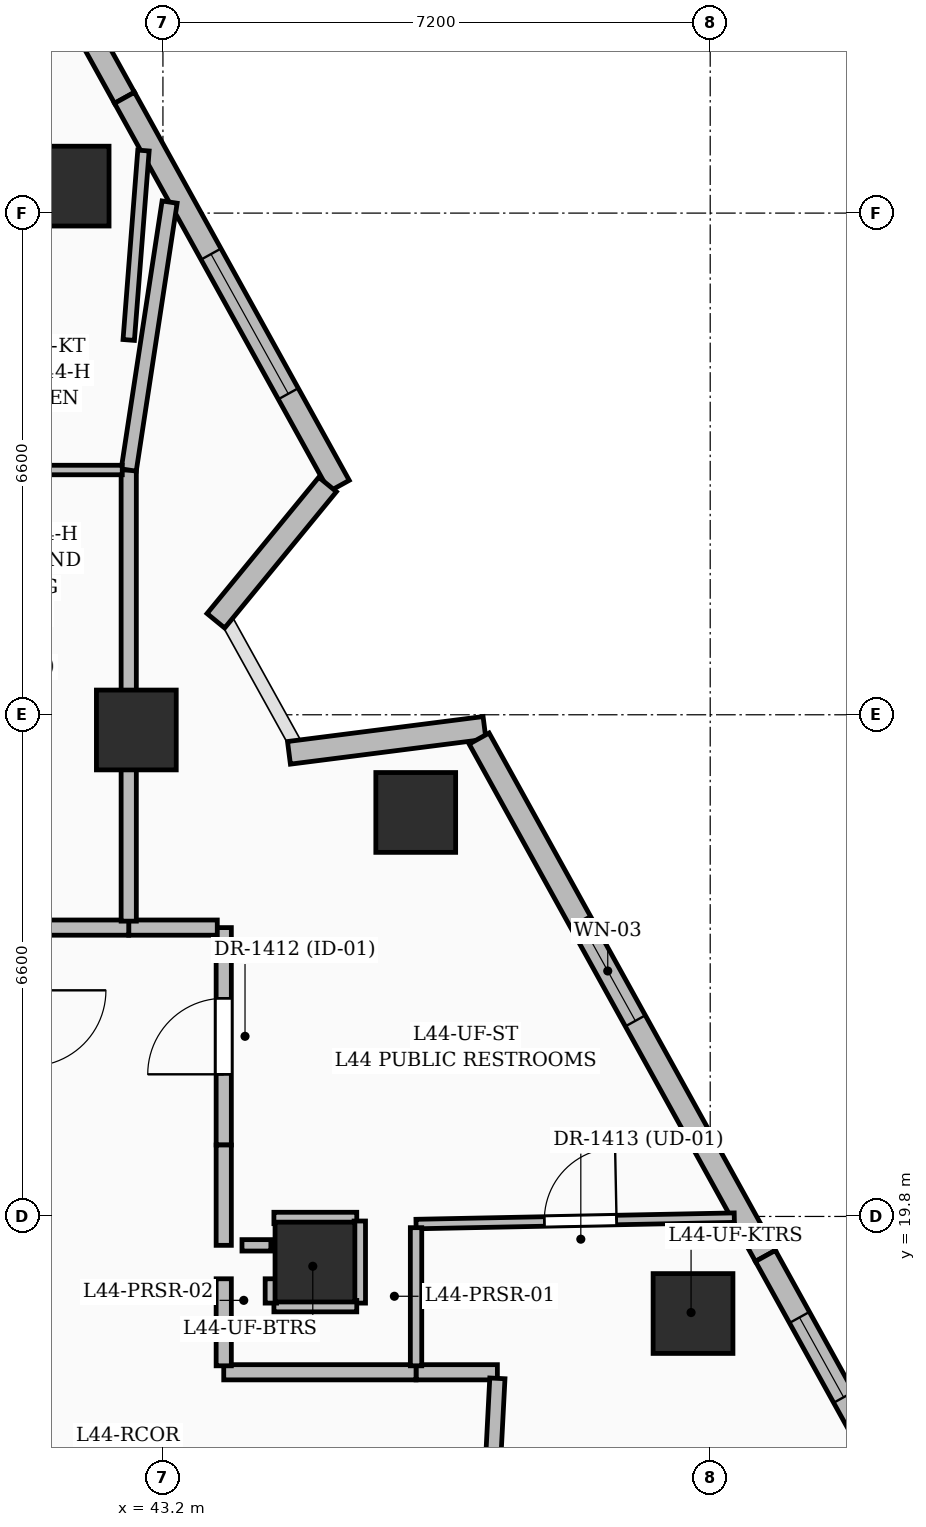
"""IFC4 building model, lengths in metres.
Left out: names, types, materials, properties, quantities, classifications, styles, units other than length and angle.
Written with IfcOpenShell. Run it as: python <this file> out.ifc"""

import sys

from ifc_helpers import new_model, si_unit, direction, frame, frame_2d, origin, origin_2d, place, context, subcontext, project, spatial, rectangle, extrude, element, fill, save


model = new_model("IFC4")
c1 = context("Model", 3, precision=1e-05, world=origin(), true_north=direction((0.0, 1.0)))
c2 = subcontext(c1, "Body", "Model", "MODEL_VIEW")
j1 = project(units=[si_unit("LENGTHUNIT", "METRE"), si_unit("PLANEANGLEUNIT", "RADIAN")], contexts=[c1])
p1 = place(None, origin())
s1 = spatial("IfcSite", under=j1, at=p1, CompositionType="ELEMENT")
p2 = place(p1, origin())
s2 = spatial("IfcBuilding", under=s1, at=p2, CompositionType="ELEMENT")
p3 = place(p2, frame((0.0, 0.0, 171.6)))
s3 = spatial("IfcBuildingStorey", under=s2, at=p3, CompositionType="ELEMENT", Elevation=171.6)
for number, where, z_axis, x_axis in (
    (1, (45.2, 19.2, 0.0), (0.0, 0.0, 1.0), (1.0, 0.0, 0.0)),
    (2, (42.85, 26.2, 0.0), (0.0, 0.0, 1.0), (1.0, 0.0, 0.0)),
    (3, (50.174, 18.523, 0.0), (0.0, 0.0, 1.0), (1.0, 0.0, 0.0)),
    (4, (46.526, 25.115, 0.0), (0.0, 0.0, 1.0), (1.0, 0.0, 0.0)),
    (5, (41.966, 33.355, 0.0), (0.0, 0.0, 1.0), (1.0, 0.0, 0.0)),
):
    element("IfcColumn", number, at=place(p3, frame(where, z_axis=z_axis, x_axis=x_axis)), inside=s3, PredefinedType="COLUMN", context=c2, shape_type="SweptSolid", body=[
        extrude(rectangle(XDim=1.05, YDim=1.05, at=origin_2d()), origin(), (0.0, 0.0, 1.0), 3.6),
    ])
p4 = place(p3, frame((40.148, 39.119, 0.0), z_axis=(0.0, 0.0, 1.0), x_axis=(0.484195973422, -0.874959575822, 0.0)))
e6 = element("IfcWall", 6, at=p4, inside=s3, PredefinedType="SOLIDWALL", context=c2, shape_type="SweptSolid", body=[
    extrude(rectangle(XDim=5.26, YDim=0.3, at=frame_2d((2.63, 0.0))), origin(), (0.0, 0.0, 1.0), 3.35),
])
p5 = place(p4, frame((1.625, 0.0, 0.6)))
e7 = element("IfcOpeningElement", 7, at=p5, cuts=e6, PredefinedType="OPENING", context=c2, shape_type="SweptSolid", body=[
    extrude(rectangle(XDim=2.4, YDim=2.1, at=frame_2d((1.2, 1.05))), frame((0.0, 0.16, 0.0), z_axis=(0.0, -1.0, 0.0), x_axis=(1.0, 0.0, 0.0)), (0.0, 0.0, 1.0), 0.32),
])
p6 = place(p3, frame((42.695, 34.517, 0.0), z_axis=(0.0, 0.0, 1.0), x_axis=(0.484178621325, -0.874969178115, 0.0)))
e8 = element("IfcWall", 8, at=p6, inside=s3, PredefinedType="SOLIDWALL", context=c2, shape_type="SweptSolid", body=[
    extrude(rectangle(XDim=5.835, YDim=0.3, at=frame_2d((2.917, 0.0))), origin(), (0.0, 0.0, 1.0), 3.35),
])
p7 = place(p6, frame((2.35, 0.0, 0.55)))
e9 = element("IfcOpeningElement", 9, at=p7, cuts=e8, PredefinedType="OPENING", context=c2, shape_type="SweptSolid", body=[
    extrude(rectangle(XDim=2.1, YDim=2.4, at=frame_2d((1.05, 1.2))), frame((0.0, 0.16, 0.0), z_axis=(0.0, -1.0, 0.0), x_axis=(1.0, 0.0, 0.0)), (0.0, 0.0, 1.0), 0.32),
])
p8 = place(p3, frame((45.366, 29.43, 0.0), z_axis=(0.0, 0.0, 1.0), x_axis=(-0.634074551455, -0.773271920606, 0.0)))
e10 = element("IfcWall", 10, at=p8, inside=s3, PredefinedType="SOLIDWALL", context=c2, shape_type="SweptSolid", body=[
    extrude(rectangle(XDim=2.319, YDim=0.3, at=frame_2d((1.159, 0.0))), origin(), (0.0, 0.0, 1.0), 2.575),
])
p9 = place(p3, frame((44.858, 25.899, 0.0), z_axis=(0.0, 0.0, 1.0), x_axis=(0.991953049751, 0.126606267974, 0.0)))
e11 = element("IfcWall", 11, at=p9, inside=s3, PredefinedType="SOLIDWALL", context=c2, shape_type="SweptSolid", body=[
    extrude(rectangle(XDim=2.594, YDim=0.3, at=frame_2d((1.297, 0.0))), origin(), (0.0, 0.0, 1.0), 2.575),
])
p10 = place(p3, frame((47.36, 26.087, 0.0), z_axis=(0.0, 0.0, 1.0), x_axis=(0.484182040501, -0.874967286049, 0.0)))
e12 = element("IfcWall", 12, at=p10, inside=s3, PredefinedType="SOLIDWALL", context=c2, shape_type="SweptSolid", body=[
    extrude(rectangle(XDim=7.779, YDim=0.3, at=frame_2d((3.89, 0.0))), origin(), (0.0, 0.0, 1.0), 3.35),
])
p11 = place(p10, frame((2.745, 0.0, 0.6)))
e13 = element("IfcOpeningElement", 13, at=p11, cuts=e12, PredefinedType="OPENING", context=c2, shape_type="SweptSolid", body=[
    extrude(rectangle(XDim=1.5, YDim=2.1, at=frame_2d((0.75, 1.05))), frame((0.0, 0.16, 0.0), z_axis=(0.0, -1.0, 0.0), x_axis=(1.0, 0.0, 0.0)), (0.0, 0.0, 1.0), 0.32),
])
p12 = place(p3, frame((51.126, 19.281, 0.0), z_axis=(0.0, 0.0, 1.0), x_axis=(0.484181305153, -0.87496769297, 0.0)))
e14 = element("IfcWall", 14, at=p12, inside=s3, PredefinedType="SOLIDWALL", context=c2, shape_type="SweptSolid", body=[
    extrude(rectangle(XDim=8.059, YDim=0.3, at=frame_2d((4.03, 0.0))), origin(), (0.0, 0.0, 1.0), 3.35),
])
p13 = place(p12, frame((6.175, 0.0, 0.8)))
e15 = element("IfcOpeningElement", 15, at=p13, cuts=e14, PredefinedType="OPENING", context=c2, shape_type="SweptSolid", body=[
    extrude(rectangle(XDim=1.2, YDim=1.8, at=frame_2d((0.6, 0.9))), frame((0.0, 0.16, 0.0), z_axis=(0.0, -1.0, 0.0), x_axis=(1.0, 0.0, 0.0)), (0.0, 0.0, 1.0), 0.32),
])
p14 = place(p12, frame((3.55, 0.0, 0.8)))
e16 = element("IfcOpeningElement", 16, at=p14, cuts=e14, PredefinedType="OPENING", context=c2, shape_type="SweptSolid", body=[
    extrude(rectangle(XDim=1.2, YDim=1.8, at=frame_2d((0.6, 0.9))), frame((0.0, 0.16, 0.0), z_axis=(0.0, -1.0, 0.0), x_axis=(1.0, 0.0, 0.0)), (0.0, 0.0, 1.0), 0.32),
])
p15 = place(p12, frame((0.925, 0.0, 0.8)))
e17 = element("IfcOpeningElement", 17, at=p15, cuts=e14, PredefinedType="OPENING", context=c2, shape_type="SweptSolid", body=[
    extrude(rectangle(XDim=1.2, YDim=1.8, at=frame_2d((0.6, 0.9))), frame((0.0, 0.16, 0.0), z_axis=(0.0, -1.0, 0.0), x_axis=(1.0, 0.0, 0.0)), (0.0, 0.0, 1.0), 0.32),
])
p16 = place(p3, frame((44.0, 20.74, 0.0), z_axis=(0.0, 0.0, 1.0), x_axis=(0.0, 1.0, 0.0)))
e18 = element("IfcWall", 18, at=p16, inside=s3, PredefinedType="PARTITIONING", context=c2, shape_type="SweptSolid", body=[
    extrude(rectangle(XDim=2.86, YDim=0.2, at=frame_2d((1.43, 0.0))), origin(), (0.0, 0.0, 1.0), 2.436),
])
p17 = place(p16, frame((0.93, 0.0, 0.0)))
e19 = element("IfcOpeningElement", 19, at=p17, cuts=e18, PredefinedType="OPENING", context=c2, shape_type="SweptSolid", body=[
    extrude(rectangle(XDim=1.0, YDim=2.2, at=frame_2d((0.5, 1.1))), frame((0.0, 0.11, 0.0), z_axis=(0.0, -1.0, 0.0), x_axis=(1.0, 0.0, 0.0)), (0.0, 0.0, 1.0), 0.22),
])
p18 = place(p3, frame((43.915, 23.6, 0.0), z_axis=(0.0, 0.0, 1.0), x_axis=(-1.0, 0.0, 0.0)))
e20 = element("IfcWall", 20, at=p18, inside=s3, PredefinedType="PARTITIONING", context=c2, shape_type="SweptSolid", body=[
    extrude(rectangle(XDim=1.165, YDim=0.2, at=frame_2d((0.583, 0.0))), origin(), (0.0, 0.0, 1.0), 2.436),
])
p19 = place(p3, frame((47.6, 17.75, 0.0), z_axis=(0.0, 0.0, 1.0), x_axis=(-1.0, 0.0, 0.0)))
e21 = element("IfcWall", 21, at=p19, inside=s3, PredefinedType="PARTITIONING", context=c2, shape_type="SweptSolid", body=[
    extrude(rectangle(XDim=1.07, YDim=0.2, at=frame_2d((0.535, 0.0))), origin(), (0.0, 0.0, 1.0), 2.787),
])
p20 = place(p3, frame((46.53, 17.75, 0.0), z_axis=(0.0, 0.0, 1.0), x_axis=(-1.0, 0.0, 0.0)))
e22 = element("IfcWall", 22, at=p20, inside=s3, PredefinedType="PARTITIONING", context=c2, shape_type="SweptSolid", body=[
    extrude(rectangle(XDim=2.53, YDim=0.2, at=frame_2d((1.265, 0.0))), origin(), (0.0, 0.0, 1.0), 2.436),
])
p21 = place(p3, frame((44.0, 17.835, 0.0), z_axis=(0.0, 0.0, 1.0), x_axis=(0.0, 1.0, 0.0)))
e23 = element("IfcWall", 23, at=p21, inside=s3, PredefinedType="PARTITIONING", context=c2, shape_type="SweptSolid", body=[
    extrude(rectangle(XDim=1.145, YDim=0.2, at=frame_2d((0.573, 0.0))), origin(), (0.0, 0.0, 1.0), 3.35),
])
p22 = place(p3, frame((42.75, 23.6, 0.0), z_axis=(0.0, 0.0, 1.0), x_axis=(-1.0, 0.0, 0.0)))
e24 = element("IfcWall", 24, at=p22, inside=s3, PredefinedType="PARTITIONING", context=c2, shape_type="SweptSolid", body=[
    extrude(rectangle(XDim=1.3, YDim=0.2, at=frame_2d((0.65, 0.0))), origin(), (0.0, 0.0, 1.0), 3.35),
])
p23 = place(p3, frame((46.53, 19.7, 0.0), z_axis=(0.0, 0.0, 1.0), x_axis=(0.999798892802, 0.020054275168, 0.0)))
e25 = element("IfcWall", 25, at=p23, inside=s3, PredefinedType="PARTITIONING", context=c2, shape_type="SweptSolid", body=[
    extrude(rectangle(XDim=4.188, YDim=0.125, at=frame_2d((2.094, 0.0))), origin(), (0.0, 0.0, 1.0), 2.57),
])
p24 = place(p23, frame((1.688, 0.0, 0.0)))
e26 = element("IfcOpeningElement", 26, at=p24, cuts=e25, PredefinedType="OPENING", context=c2, shape_type="SweptSolid", body=[
    extrude(rectangle(XDim=0.95, YDim=2.2, at=frame_2d((0.475, 1.1))), frame((0.0, 0.072, 0.0), z_axis=(0.0, -1.0, 0.0), x_axis=(1.0, 0.0, 0.0)), (0.0, 0.0, 1.0), 0.145),
])
p25 = place(p3, frame((42.75, 29.62, 0.0), z_axis=(0.0, 0.0, 1.0), x_axis=(0.0, -1.0, 0.0)))
e27 = element("IfcWall", 27, at=p25, inside=s3, PredefinedType="PARTITIONING", context=c2, shape_type="SweptSolid", body=[
    extrude(rectangle(XDim=5.935, YDim=0.2, at=frame_2d((2.968, 0.0))), origin(), (0.0, 0.0, 1.0), 1.12),
])
p26 = place(p3, frame((43.288, 33.145, 0.0), z_axis=(0.0, 0.0, 1.0), x_axis=(-0.150904593609, -0.988548331458, 0.0)))
e28 = element("IfcWall", 28, at=p26, inside=s3, PredefinedType="PARTITIONING", context=c2, shape_type="SweptSolid", body=[
    extrude(rectangle(XDim=3.566, YDim=0.2, at=frame_2d((1.783, 0.0))), origin(), (0.0, 0.0, 1.0), 1.12),
])
p27 = place(p3, frame((46.53, 19.653, 0.0), z_axis=(0.0, 0.0, 1.0), x_axis=(0.0, -1.0, 0.0)))
e29 = element("IfcWall", 29, at=p27, inside=s3, PredefinedType="PARTITIONING", context=c2, shape_type="SweptSolid", body=[
    extrude(rectangle(XDim=1.818, YDim=0.15, at=frame_2d((0.909, 0.0))), origin(), (0.0, 0.0, 1.0), 2.787),
])
p28 = place(p3, frame((42.665, 29.62, 0.0), z_axis=(0.0, 0.0, 1.0), x_axis=(-1.0, 0.0, 0.0)))
e30 = element("IfcWall", 30, at=p28, inside=s3, PredefinedType="PARTITIONING", context=c2, shape_type="SweptSolid", body=[
    extrude(rectangle(XDim=2.725, YDim=0.125, at=frame_2d((1.363, 0.0))), origin(), (0.0, 0.0, 1.0), 1.12),
])
p29 = place(p3, frame((44.0, 19.42, 0.0), z_axis=(0.0, 0.0, 1.0), x_axis=(0.0, 1.0, 0.0)))
e31 = element("IfcWall", 31, at=p29, inside=s3, PredefinedType="PARTITIONING", context=c2, shape_type="SweptSolid", body=[
    extrude(rectangle(XDim=1.32, YDim=0.2, at=frame_2d((0.66, 0.0))), origin(), (0.0, 0.0, 1.0), 3.35),
])
p30 = place(p3, frame((47.425, 14.28, 0.0), z_axis=(0.0, 0.0, 1.0), x_axis=(0.051569748391, 0.998669395271, 0.0)))
e32 = element("IfcWall", 32, at=p30, inside=s3, PredefinedType="PARTITIONING", context=c2, shape_type="SweptSolid", body=[
    extrude(rectangle(XDim=3.395, YDim=0.2, at=frame_2d((1.697, 0.0))), origin(), (0.0, 0.0, 1.0), 1.12),
])
p31 = place(p3, frame((42.944, 33.823, 0.0), z_axis=(0.0, 0.0, 1.0), x_axis=(-0.077652540781, -0.996980482713, 0.0)))
e33 = element("IfcWall", 33, at=p31, inside=s3, PredefinedType="PARTITIONING", context=c2, shape_type="SweptSolid", body=[
    extrude(rectangle(XDim=2.5, YDim=0.15, at=frame_2d((1.25, 0.0))), origin(), (0.0, 0.0, 1.0), 1.12),
])
p32 = place(p3, frame((44.24, 19.42, 0.0), z_axis=(0.0, 0.0, 1.0), x_axis=(1.0, 0.0, 0.0)))
e34 = element("IfcWall", 34, at=p32, inside=s3, PredefinedType="PARTITIONING", context=c2, shape_type="SweptSolid", body=[
    extrude(rectangle(XDim=0.38, YDim=0.15, at=frame_2d((0.19, 0.0))), origin(), (0.0, 0.0, 1.0), 3.35),
])
p33 = place(p3, frame((44.66, 19.78, 0.0), z_axis=(0.0, 0.0, 1.0), x_axis=(1.0, 0.0, 0.0)))
e35 = element("IfcWall", 35, at=p33, inside=s3, PredefinedType="PARTITIONING", context=c2, shape_type="SweptSolid", body=[
    extrude(rectangle(XDim=1.09, YDim=0.15, at=frame_2d((0.545, 0.0))), origin(), (0.0, 0.0, 1.0), 1.12),
])
p34 = place(p3, frame((45.79, 19.74, 0.0), z_axis=(0.0, 0.0, 1.0), x_axis=(0.0, -1.0, 0.0)))
e36 = element("IfcWall", 36, at=p34, inside=s3, PredefinedType="PARTITIONING", context=c2, shape_type="SweptSolid", body=[
    extrude(rectangle(XDim=1.08, YDim=0.15, at=frame_2d((0.54, 0.0))), origin(), (0.0, 0.0, 1.0), 1.12),
])
p35 = place(p3, frame((45.75, 18.62, 0.0), z_axis=(0.0, 0.0, 1.0), x_axis=(-1.0, 0.0, 0.0)))
e37 = element("IfcWall", 37, at=p35, inside=s3, PredefinedType="PARTITIONING", context=c2, shape_type="SweptSolid", body=[
    extrude(rectangle(XDim=1.09, YDim=0.15, at=frame_2d((0.545, 0.0))), origin(), (0.0, 0.0, 1.0), 2.436),
])
p36 = place(p3, frame((44.62, 18.66, 0.0), z_axis=(0.0, 0.0, 1.0), x_axis=(0.0, 1.0, 0.0)))
e38 = element("IfcWall", 38, at=p36, inside=s3, PredefinedType="PARTITIONING", context=c2, shape_type="SweptSolid", body=[
    extrude(rectangle(XDim=0.32, YDim=0.15, at=frame_2d((0.16, 0.0))), origin(), (0.0, 0.0, 1.0), 3.35),
])
p37 = place(p7, origin())
e39 = element("IfcWindow", 39, at=p37, inside=s3, PartitioningType="SINGLE_PANEL", PredefinedType="WINDOW", context=c2, shape_type="SweptSolid", body=[
    extrude(rectangle(XDim=2.1, YDim=2.4, at=frame_2d((1.05, 1.2))), frame((0.0, 0.03, 0.0), z_axis=(0.0, -1.0, 0.0), x_axis=(1.0, 0.0, 0.0)), (0.0, 0.0, 1.0), 0.06),
])
fill(e9, e39)
p38 = place(p11, origin())
e40 = element("IfcWindow", 40, at=p38, inside=s3, PartitioningType="SINGLE_PANEL", PredefinedType="WINDOW", context=c2, shape_type="SweptSolid", body=[
    extrude(rectangle(XDim=1.5, YDim=2.1, at=frame_2d((0.75, 1.05))), frame((0.0, 0.03, 0.0), z_axis=(0.0, -1.0, 0.0), x_axis=(1.0, 0.0, 0.0)), (0.0, 0.0, 1.0), 0.06),
])
fill(e13, e40)
p39 = place(p15, origin())
e41 = element("IfcWindow", 41, at=p39, inside=s3, PartitioningType="SINGLE_PANEL", PredefinedType="WINDOW", context=c2, shape_type="SweptSolid", body=[
    extrude(rectangle(XDim=1.2, YDim=1.8, at=frame_2d((0.6, 0.9))), frame((0.0, 0.03, 0.0), z_axis=(0.0, -1.0, 0.0), x_axis=(1.0, 0.0, 0.0)), (0.0, 0.0, 1.0), 0.06),
])
fill(e17, e41)
p40 = place(p17, origin())
e42 = element("IfcDoor", 42, at=p40, inside=s3, OperationType="SINGLE_SWING_LEFT", PredefinedType="DOOR", context=c2, shape_type="SweptSolid", body=[
    extrude(rectangle(XDim=1.0, YDim=2.2, at=frame_2d((0.5, 1.1))), frame((0.0, 0.025, 0.0), z_axis=(0.0, -1.0, 0.0), x_axis=(1.0, 0.0, 0.0)), (0.0, 0.0, 1.0), 0.05),
])
fill(e19, e42)
p41 = place(p24, origin())
e43 = element("IfcDoor", 43, at=p41, inside=s3, OperationType="SINGLE_SWING_RIGHT", PredefinedType="DOOR", context=c2, shape_type="SweptSolid", body=[
    extrude(rectangle(XDim=0.95, YDim=2.2, at=frame_2d((0.475, 1.1))), frame((0.0, 0.025, 0.0), z_axis=(0.0, -1.0, 0.0), x_axis=(1.0, 0.0, 0.0)), (0.0, 0.0, 1.0), 0.05),
])
fill(e26, e43)
save(model, sys.argv[1])
